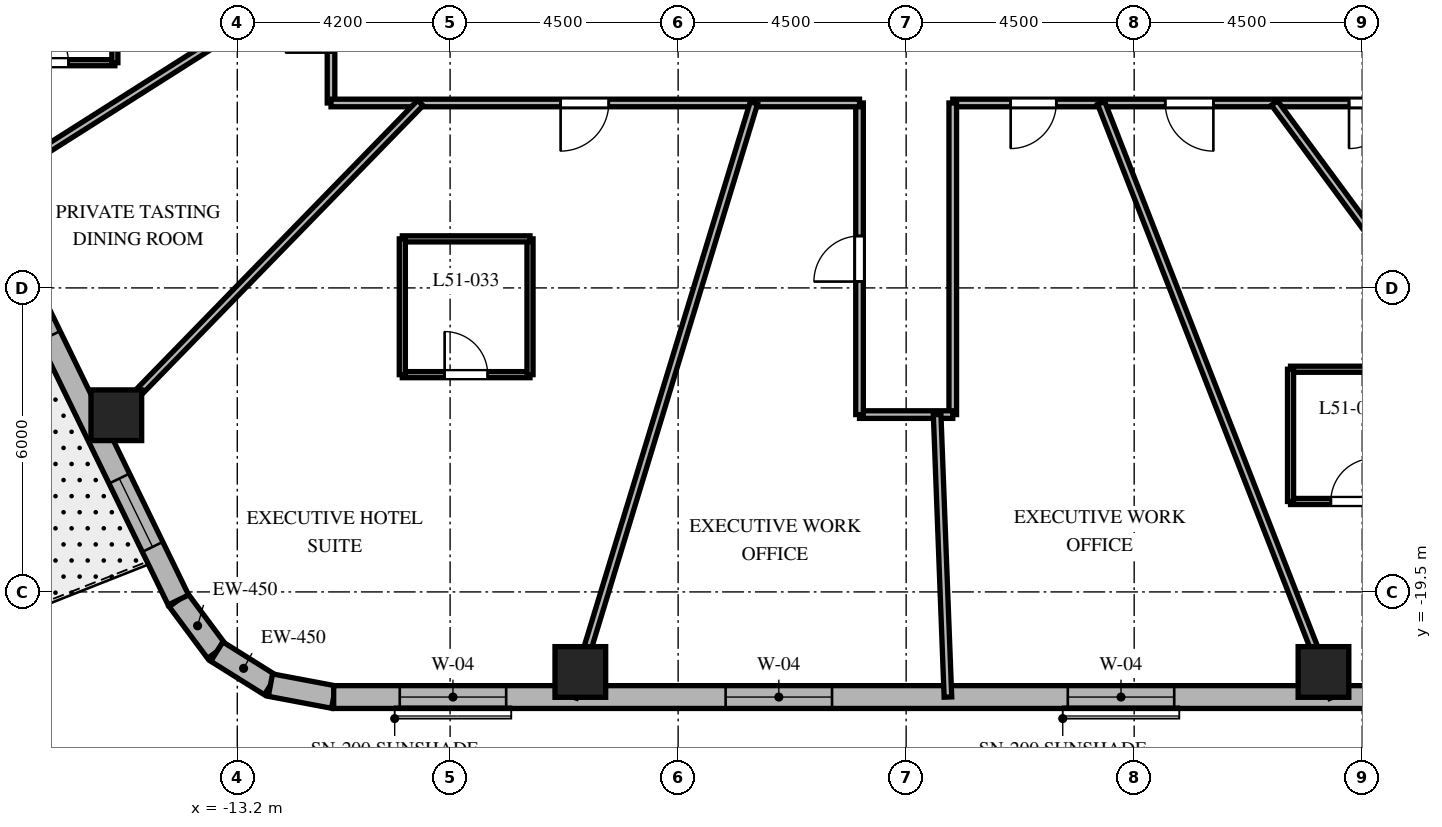
"""IFC4 building model, lengths in metres.
Left out: names, types, materials, properties, quantities, classifications, styles, units other than length and angle.
Written with IfcOpenShell. Run it as: python <this file> out.ifc"""

import sys

from ifc_helpers import new_model, si_unit, direction, frame, frame_2d, origin, origin_2d, place, context, subcontext, project, spatial, rectangle, extrude, element, fill, save


model = new_model("IFC4")
c1 = context("Model", 3, precision=1e-05, world=origin(), true_north=direction((0.0, 1.0)))
c2 = subcontext(c1, "Body", "Model", "MODEL_VIEW")
j1 = project(units=[si_unit("LENGTHUNIT", "METRE"), si_unit("PLANEANGLEUNIT", "RADIAN")], contexts=[c1])
p1 = place(None, origin())
s1 = spatial("IfcSite", under=j1, at=p1, CompositionType="ELEMENT")
p2 = place(p1, origin())
s2 = spatial("IfcBuilding", under=s1, at=p2, CompositionType="ELEMENT")
p3 = place(p2, frame((0.0, 0.0, 206.5)))
s3 = spatial("IfcBuildingStorey", under=s2, at=p3, CompositionType="ELEMENT", Elevation=206.5)
for number, where, z_axis, x_axis in (
    (1, (-6.43, -21.08, 0.0), (0.0, 0.0, 1.0), (1.0, 0.0, 0.0)),
    (2, (8.236, -21.08, 0.0), (0.0, 0.0, 1.0), (1.0, 0.0, 0.0)),
    (3, (-15.587, -16.013, 0.0), (0.0, 0.0, 1.0), (1.0, 0.0, 0.0)),
):
    element("IfcColumn", number, at=place(p3, frame(where, z_axis=z_axis, x_axis=x_axis)), inside=s3, PredefinedType="COLUMN", context=c2, shape_type="SweptSolid", body=[
        extrude(rectangle(XDim=1.0, YDim=1.0, at=origin_2d()), origin(), (0.0, 0.0, 1.0), 3.8),
    ])
p4 = place(p3, frame((-14.362, -19.658, 0.0), z_axis=(0.0, 0.0, 1.0), x_axis=(0.596642462792, -0.80250717853, 0.0)))
e4 = element("IfcWall", 4, at=p4, inside=s3, PredefinedType="SOLIDWALL", context=c2, shape_type="SweptSolid", body=[
    extrude(rectangle(XDim=1.27, YDim=0.45, at=frame_2d((0.635, 0.0))), origin(), (0.0, 0.0, 1.0), 3.5),
])
p5 = place(p3, frame((-13.604, -20.678, 0.0), z_axis=(0.0, 0.0, 1.0), x_axis=(0.847910404124, -0.53013955387, 0.0)))
e5 = element("IfcWall", 5, at=p5, inside=s3, PredefinedType="SOLIDWALL", context=c2, shape_type="SweptSolid", body=[
    extrude(rectangle(XDim=1.249, YDim=0.45, at=frame_2d((0.624, 0.0))), origin(), (0.0, 0.0, 1.0), 3.5),
])
p6 = place(p3, frame((-12.546, -21.34, 0.0), z_axis=(0.0, 0.0, 1.0), x_axis=(0.982686750835, -0.18527479519, 0.0)))
e6 = element("IfcWall", 6, at=p6, inside=s3, PredefinedType="SOLIDWALL", context=c2, shape_type="SweptSolid", body=[
    extrude(rectangle(XDim=1.27, YDim=0.45, at=frame_2d((0.635, 0.0))), origin(), (0.0, 0.0, 1.0), 3.5),
])
p7 = place(p3, frame((-11.298, -21.575, 0.0), z_axis=(0.0, 0.0, 1.0), x_axis=(1.0, 0.0, 0.0)))
e7 = element("IfcWall", 7, at=p7, inside=s3, PredefinedType="SOLIDWALL", context=c2, shape_type="SweptSolid", body=[
    extrude(rectangle(XDim=24.399, YDim=0.45, at=frame_2d((12.2, 0.0))), origin(), (0.0, 0.0, 1.0), 3.5),
])
p8 = place(p7, frame((1.304, 0.0, 0.8)))
e8 = element("IfcOpeningElement", 8, at=p8, cuts=e7, PredefinedType="OPENING", context=c2, shape_type="SweptSolid", body=[
    extrude(rectangle(XDim=2.1, YDim=1.85, at=frame_2d((1.05, 0.925))), frame((0.0, 0.235, 0.0), z_axis=(0.0, -1.0, 0.0), x_axis=(1.0, 0.0, 0.0)), (0.0, 0.0, 1.0), 0.47),
])
p9 = place(p7, frame((7.735, 0.0, 0.8)))
e9 = element("IfcOpeningElement", 9, at=p9, cuts=e7, PredefinedType="OPENING", context=c2, shape_type="SweptSolid", body=[
    extrude(rectangle(XDim=2.1, YDim=1.85, at=frame_2d((1.05, 0.925))), frame((0.0, 0.235, 0.0), z_axis=(0.0, -1.0, 0.0), x_axis=(1.0, 0.0, 0.0)), (0.0, 0.0, 1.0), 0.47),
])
p10 = place(p7, frame((14.488, 0.0, 0.8)))
e10 = element("IfcOpeningElement", 10, at=p10, cuts=e7, PredefinedType="OPENING", context=c2, shape_type="SweptSolid", body=[
    extrude(rectangle(XDim=2.1, YDim=1.85, at=frame_2d((1.05, 0.925))), frame((0.0, 0.235, 0.0), z_axis=(0.0, -1.0, 0.0), x_axis=(1.0, 0.0, 0.0)), (0.0, 0.0, 1.0), 0.47),
])
p11 = place(p7, frame((20.996, 0.0, 0.8)))
e11 = element("IfcOpeningElement", 11, at=p11, cuts=e7, PredefinedType="OPENING", context=c2, shape_type="SweptSolid", body=[
    extrude(rectangle(XDim=2.1, YDim=1.85, at=frame_2d((1.05, 0.925))), frame((0.0, 0.235, 0.0), z_axis=(0.0, -1.0, 0.0), x_axis=(1.0, 0.0, 0.0)), (0.0, 0.0, 1.0), 0.47),
])
p12 = place(p3, frame((-22.74, -2.452, 0.0), z_axis=(0.0, 0.0, 1.0), x_axis=(0.437753424814, -0.899095066755, 0.0)))
e12 = element("IfcWall", 12, at=p12, inside=s3, PredefinedType="SOLIDWALL", context=c2, shape_type="SweptSolid", body=[
    extrude(rectangle(XDim=19.137, YDim=0.45, at=frame_2d((9.569, 0.0))), origin(), (0.0, 0.0, 1.0), 3.5),
])
p13 = place(p12, frame((4.763, 0.0, 0.0)))
e13 = element("IfcOpeningElement", 13, at=p13, cuts=e12, PredefinedType="OPENING", context=c2, shape_type="SweptSolid", body=[
    extrude(rectangle(XDim=0.95, YDim=2.15, at=frame_2d((0.475, 1.075))), frame((0.0, 0.235, 0.0), z_axis=(0.0, -1.0, 0.0), x_axis=(1.0, 0.0, 0.0)), (0.0, 0.0, 1.0), 0.47),
])
p14 = place(p12, frame((1.216, 0.0, 0.8)))
e14 = element("IfcOpeningElement", 14, at=p14, cuts=e12, PredefinedType="OPENING", context=c2, shape_type="SweptSolid", body=[
    extrude(rectangle(XDim=1.5, YDim=1.8, at=frame_2d((0.75, 0.9))), frame((0.0, 0.235, 0.0), z_axis=(0.0, -1.0, 0.0), x_axis=(1.0, 0.0, 0.0)), (0.0, 0.0, 1.0), 0.47),
])
p15 = place(p12, frame((6.451, 0.0, 0.8)))
e15 = element("IfcOpeningElement", 15, at=p15, cuts=e12, PredefinedType="OPENING", context=c2, shape_type="SweptSolid", body=[
    extrude(rectangle(XDim=1.5, YDim=1.8, at=frame_2d((0.75, 0.9))), frame((0.0, 0.235, 0.0), z_axis=(0.0, -1.0, 0.0), x_axis=(1.0, 0.0, 0.0)), (0.0, 0.0, 1.0), 0.47),
])
p16 = place(p12, frame((11.845, 0.0, 0.8)))
e16 = element("IfcOpeningElement", 16, at=p16, cuts=e12, PredefinedType="OPENING", context=c2, shape_type="SweptSolid", body=[
    extrude(rectangle(XDim=1.5, YDim=1.8, at=frame_2d((0.75, 0.9))), frame((0.0, 0.235, 0.0), z_axis=(0.0, -1.0, 0.0), x_axis=(1.0, 0.0, 0.0)), (0.0, 0.0, 1.0), 0.47),
])
p17 = place(p12, frame((16.473, 0.0, 0.8)))
e17 = element("IfcOpeningElement", 17, at=p17, cuts=e12, PredefinedType="OPENING", context=c2, shape_type="SweptSolid", body=[
    extrude(rectangle(XDim=1.5, YDim=1.8, at=frame_2d((0.75, 0.9))), frame((0.0, 0.235, 0.0), z_axis=(0.0, -1.0, 0.0), x_axis=(1.0, 0.0, 0.0)), (0.0, 0.0, 1.0), 0.47),
])
p18 = place(p3, frame((-11.35, -9.85, 0.0), z_axis=(0.0, 0.0, 1.0), x_axis=(0.0, 1.0, 0.0)))
e18 = element("IfcWall", 18, at=p18, inside=s3, PredefinedType="PARTITIONING", context=c2, shape_type="SweptSolid", body=[
    extrude(rectangle(XDim=12.4, YDim=0.15, at=frame_2d((6.2, 0.0))), origin(), (0.0, 0.0, 1.0), 2.99),
])
p19 = place(p18, frame((8.835, 0.0, 0.0)))
e19 = element("IfcOpeningElement", 19, at=p19, cuts=e18, PredefinedType="OPENING", context=c2, shape_type="SweptSolid", body=[
    extrude(rectangle(XDim=0.95, YDim=2.03, at=frame_2d((0.475, 1.015))), frame((0.0, 0.085, 0.0), z_axis=(0.0, -1.0, 0.0), x_axis=(1.0, 0.0, 0.0)), (0.0, 0.0, 1.0), 0.17),
])
p20 = place(p18, frame((4.191, 0.0, 0.0)))
e20 = element("IfcOpeningElement", 20, at=p20, cuts=e18, PredefinedType="OPENING", context=c2, shape_type="SweptSolid", body=[
    extrude(rectangle(XDim=0.95, YDim=2.03, at=frame_2d((0.475, 1.015))), frame((0.0, 0.085, 0.0), z_axis=(0.0, -1.0, 0.0), x_axis=(1.0, 0.0, 0.0)), (0.0, 0.0, 1.0), 0.17),
])
p21 = place(p18, frame((0.994, 0.0, 0.0)))
e21 = element("IfcOpeningElement", 21, at=p21, cuts=e18, PredefinedType="OPENING", context=c2, shape_type="SweptSolid", body=[
    extrude(rectangle(XDim=0.9, YDim=2.03, at=frame_2d((0.45, 1.015))), frame((0.0, 0.085, 0.0), z_axis=(0.0, -1.0, 0.0), x_axis=(1.0, 0.0, 0.0)), (0.0, 0.0, 1.0), 0.17),
])
p22 = place(p3, frame((11.35, -9.85, 0.0), z_axis=(0.0, 0.0, 1.0), x_axis=(-1.0, 0.0, 0.0)))
e22 = element("IfcWall", 22, at=p22, inside=s3, PredefinedType="PARTITIONING", context=c2, shape_type="SweptSolid", body=[
    extrude(rectangle(XDim=10.43, YDim=0.15, at=frame_2d((5.215, 0.0))), origin(), (0.0, 0.0, 1.0), 2.99),
])
p23 = place(p22, frame((8.387, 0.0, 0.0)))
e23 = element("IfcOpeningElement", 23, at=p23, cuts=e22, PredefinedType="OPENING", context=c2, shape_type="SweptSolid", body=[
    extrude(rectangle(XDim=0.9, YDim=2.03, at=frame_2d((0.45, 1.015))), frame((0.0, 0.085, 0.0), z_axis=(0.0, -1.0, 0.0), x_axis=(1.0, 0.0, 0.0)), (0.0, 0.0, 1.0), 0.17),
])
p24 = place(p22, frame((5.287, 0.0, 0.0)))
e24 = element("IfcOpeningElement", 24, at=p24, cuts=e22, PredefinedType="OPENING", context=c2, shape_type="SweptSolid", body=[
    extrude(rectangle(XDim=0.95, YDim=2.03, at=frame_2d((0.475, 1.015))), frame((0.0, 0.085, 0.0), z_axis=(0.0, -1.0, 0.0), x_axis=(1.0, 0.0, 0.0)), (0.0, 0.0, 1.0), 0.17),
])
p25 = place(p22, frame((1.71, 0.0, 0.0)))
e25 = element("IfcOpeningElement", 25, at=p25, cuts=e22, PredefinedType="OPENING", context=c2, shape_type="SweptSolid", body=[
    extrude(rectangle(XDim=0.9, YDim=2.03, at=frame_2d((0.45, 1.015))), frame((0.0, 0.085, 0.0), z_axis=(0.0, -1.0, 0.0), x_axis=(1.0, 0.0, 0.0)), (0.0, 0.0, 1.0), 0.17),
])
p26 = place(p3, frame((0.92, -9.85, 0.0), z_axis=(0.0, 0.0, 1.0), x_axis=(0.0, -1.0, 0.0)))
e26 = element("IfcWall", 26, at=p26, inside=s3, PredefinedType="PARTITIONING", context=c2, shape_type="SweptSolid", body=[
    extrude(rectangle(XDim=6.15, YDim=0.15, at=frame_2d((3.075, 0.0))), origin(), (0.0, 0.0, 1.0), 3.027),
])
p27 = place(p3, frame((0.92, -16.0, 0.0), z_axis=(0.0, 0.0, 1.0), x_axis=(-1.0, 0.0, 0.0)))
e27 = element("IfcWall", 27, at=p27, inside=s3, PredefinedType="PARTITIONING", context=c2, shape_type="SweptSolid", body=[
    extrude(rectangle(XDim=1.84, YDim=0.15, at=frame_2d((0.92, 0.0))), origin(), (0.0, 0.0, 1.0), 3.5),
])
p28 = place(p3, frame((-0.92, -16.0, 0.0), z_axis=(0.0, 0.0, 1.0), x_axis=(0.0, 1.0, 0.0)))
e28 = element("IfcWall", 28, at=p28, inside=s3, PredefinedType="PARTITIONING", context=c2, shape_type="SweptSolid", body=[
    extrude(rectangle(XDim=6.15, YDim=0.15, at=frame_2d((3.075, 0.0))), origin(), (0.0, 0.0, 1.0), 3.027),
])
p29 = place(p28, frame((2.625, 0.0, 0.0)))
e29 = element("IfcOpeningElement", 29, at=p29, cuts=e28, PredefinedType="OPENING", context=c2, shape_type="SweptSolid", body=[
    extrude(rectangle(XDim=0.9, YDim=2.03, at=frame_2d((0.45, 1.015))), frame((0.0, 0.085, 0.0), z_axis=(0.0, -1.0, 0.0), x_axis=(1.0, 0.0, 0.0)), (0.0, 0.0, 1.0), 0.17),
])
p30 = place(p3, frame((-0.92, -9.85, 0.0), z_axis=(0.0, 0.0, 1.0), x_axis=(-1.0, 0.0, 0.0)))
e30 = element("IfcWall", 30, at=p30, inside=s3, PredefinedType="PARTITIONING", context=c2, shape_type="SweptSolid", body=[
    extrude(rectangle(XDim=10.43, YDim=0.15, at=frame_2d((5.215, 0.0))), origin(), (0.0, 0.0, 1.0), 2.99),
])
p31 = place(p30, frame((4.949, 0.0, 0.0)))
e31 = element("IfcOpeningElement", 31, at=p31, cuts=e30, PredefinedType="OPENING", context=c2, shape_type="SweptSolid", body=[
    extrude(rectangle(XDim=0.95, YDim=2.03, at=frame_2d((0.475, 1.015))), frame((0.0, 0.085, 0.0), z_axis=(0.0, -1.0, 0.0), x_axis=(1.0, 0.0, 0.0)), (0.0, 0.0, 1.0), 0.17),
])
p32 = place(p3, frame((-11.35, -7.202, 0.0), z_axis=(0.0, 0.0, 1.0), x_axis=(-0.844364592263, -0.535769013039, 0.0)))
e32 = element("IfcWall", 32, at=p32, inside=s3, PredefinedType="PARTITIONING", context=c2, shape_type="SweptSolid", body=[
    extrude(rectangle(XDim=8.213, YDim=0.15, at=frame_2d((4.106, 0.0))), origin(), (0.0, 0.0, 1.0), 2.74),
])
p33 = place(p3, frame((-9.588, -9.85, 0.0), z_axis=(0.0, 0.0, 1.0), x_axis=(-0.697519469595, -0.716565830567, 0.0)))
e33 = element("IfcWall", 33, at=p33, inside=s3, PredefinedType="PARTITIONING", context=c2, shape_type="SweptSolid", body=[
    extrude(rectangle(XDim=9.126, YDim=0.15, at=frame_2d((4.563, 0.0))), origin(), (0.0, 0.0, 1.0), 2.74),
])
p34 = place(p3, frame((-3.004, -9.85, 0.0), z_axis=(0.0, 0.0, 1.0), x_axis=(-0.291775760688, -0.956486751333, 0.0)))
e34 = element("IfcWall", 34, at=p34, inside=s3, PredefinedType="PARTITIONING", context=c2, shape_type="SweptSolid", body=[
    extrude(rectangle(XDim=12.258, YDim=0.15, at=frame_2d((6.129, 0.0))), origin(), (0.0, 0.0, 1.0), 2.74),
])
p35 = place(p3, frame((0.612, -16.0, 0.0), z_axis=(0.0, 0.0, 1.0), x_axis=(0.038202877739, -0.999270003619, 0.0)))
e35 = element("IfcWall", 35, at=p35, inside=s3, PredefinedType="PARTITIONING", context=c2, shape_type="SweptSolid", body=[
    extrude(rectangle(XDim=5.579, YDim=0.15, at=frame_2d((2.79, 0.0))), origin(), (0.0, 0.0, 1.0), 2.74),
])
p36 = place(p3, frame((3.848, -9.85, 0.0), z_axis=(0.0, 0.0, 1.0), x_axis=(0.363921778212, -0.931429513889, 0.0)))
e36 = element("IfcWall", 36, at=p36, inside=s3, PredefinedType="PARTITIONING", context=c2, shape_type="SweptSolid", body=[
    extrude(rectangle(XDim=12.588, YDim=0.15, at=frame_2d((6.294, 0.0))), origin(), (0.0, 0.0, 1.0), 2.74),
])
p37 = place(p3, frame((7.269, -9.85, 0.0), z_axis=(0.0, 0.0, 1.0), x_axis=(0.593814492791, -0.8046019812, 0.0)))
e37 = element("IfcWall", 37, at=p37, inside=s3, PredefinedType="PARTITIONING", context=c2, shape_type="SweptSolid", body=[
    extrude(rectangle(XDim=13.338, YDim=0.15, at=frame_2d((6.669, 0.0))), origin(), (0.0, 0.0, 1.0), 2.74),
])
p38 = place(p3, frame((-18.296, -9.055, 0.0), z_axis=(0.0, 0.0, 1.0), x_axis=(1.0, 0.0, 0.0)))
e38 = element("IfcWall", 38, at=p38, inside=s3, PredefinedType="PARTITIONING", context=c2, shape_type="SweptSolid", body=[
    extrude(rectangle(XDim=2.68, YDim=0.12, at=frame_2d((1.34, 0.0))), origin(), (0.0, 0.0, 1.0), 3.027),
])
p39 = place(p38, frame((0.915, 0.0, 0.0)))
e39 = element("IfcOpeningElement", 39, at=p39, cuts=e38, PredefinedType="OPENING", context=c2, shape_type="SweptSolid", body=[
    extrude(rectangle(XDim=0.85, YDim=2.03, at=frame_2d((0.425, 1.015))), frame((0.0, 0.07, 0.0), z_axis=(0.0, -1.0, 0.0), x_axis=(1.0, 0.0, 0.0)), (0.0, 0.0, 1.0), 0.14),
])
p40 = place(p3, frame((-15.616, -9.055, 0.0), z_axis=(0.0, 0.0, 1.0), x_axis=(0.0, 1.0, 0.0)))
e40 = element("IfcWall", 40, at=p40, inside=s3, PredefinedType="PARTITIONING", context=c2, shape_type="SweptSolid", body=[
    extrude(rectangle(XDim=2.54, YDim=0.12, at=frame_2d((1.27, 0.0))), origin(), (0.0, 0.0, 1.0), 2.99),
])
p41 = place(p3, frame((-9.943, -15.212, 0.0), z_axis=(0.0, 0.0, 1.0), x_axis=(1.0, 0.0, 0.0)))
e41 = element("IfcWall", 41, at=p41, inside=s3, PredefinedType="PARTITIONING", context=c2, shape_type="SweptSolid", body=[
    extrude(rectangle(XDim=2.52, YDim=0.12, at=frame_2d((1.26, 0.0))), origin(), (0.0, 0.0, 1.0), 3.073),
])
p42 = place(p41, frame((0.835, 0.0, 0.0)))
e42 = element("IfcOpeningElement", 42, at=p42, cuts=e41, PredefinedType="OPENING", context=c2, shape_type="SweptSolid", body=[
    extrude(rectangle(XDim=0.85, YDim=2.03, at=frame_2d((0.425, 1.015))), frame((0.0, 0.07, 0.0), z_axis=(0.0, -1.0, 0.0), x_axis=(1.0, 0.0, 0.0)), (0.0, 0.0, 1.0), 0.14),
])
p43 = place(p3, frame((-7.423, -15.212, 0.0), z_axis=(0.0, 0.0, 1.0), x_axis=(0.0, 1.0, 0.0)))
e43 = element("IfcWall", 43, at=p43, inside=s3, PredefinedType="PARTITIONING", context=c2, shape_type="SweptSolid", body=[
    extrude(rectangle(XDim=2.68, YDim=0.12, at=frame_2d((1.34, 0.0))), origin(), (0.0, 0.0, 1.0), 2.94),
])
p44 = place(p3, frame((-7.423, -12.532, 0.0), z_axis=(0.0, 0.0, 1.0), x_axis=(-1.0, 0.0, 0.0)))
e44 = element("IfcWall", 44, at=p44, inside=s3, PredefinedType="PARTITIONING", context=c2, shape_type="SweptSolid", body=[
    extrude(rectangle(XDim=2.52, YDim=0.12, at=frame_2d((1.26, 0.0))), origin(), (0.0, 0.0, 1.0), 2.94),
])
p45 = place(p3, frame((-9.943, -12.532, 0.0), z_axis=(0.0, 0.0, 1.0), x_axis=(0.0, -1.0, 0.0)))
e45 = element("IfcWall", 45, at=p45, inside=s3, PredefinedType="PARTITIONING", context=c2, shape_type="SweptSolid", body=[
    extrude(rectangle(XDim=2.68, YDim=0.12, at=frame_2d((1.34, 0.0))), origin(), (0.0, 0.0, 1.0), 3.073),
])
p46 = place(p3, frame((7.586, -17.715, 0.0), z_axis=(0.0, 0.0, 1.0), x_axis=(1.0, 0.0, 0.0)))
e46 = element("IfcWall", 46, at=p46, inside=s3, PredefinedType="PARTITIONING", context=c2, shape_type="SweptSolid", body=[
    extrude(rectangle(XDim=2.44, YDim=0.12, at=frame_2d((1.22, 0.0))), origin(), (0.0, 0.0, 1.0), 2.99),
])
p47 = place(p46, frame((0.795, 0.0, 0.0)))
e47 = element("IfcOpeningElement", 47, at=p47, cuts=e46, PredefinedType="OPENING", context=c2, shape_type="SweptSolid", body=[
    extrude(rectangle(XDim=0.85, YDim=2.03, at=frame_2d((0.425, 1.015))), frame((0.0, 0.07, 0.0), z_axis=(0.0, -1.0, 0.0), x_axis=(1.0, 0.0, 0.0)), (0.0, 0.0, 1.0), 0.14),
])
p48 = place(p3, frame((10.026, -15.105, 0.0), z_axis=(0.0, 0.0, 1.0), x_axis=(-1.0, 0.0, 0.0)))
e48 = element("IfcWall", 48, at=p48, inside=s3, PredefinedType="PARTITIONING", context=c2, shape_type="SweptSolid", body=[
    extrude(rectangle(XDim=2.44, YDim=0.12, at=frame_2d((1.22, 0.0))), origin(), (0.0, 0.0, 1.0), 2.99),
])
p49 = place(p3, frame((7.586, -15.105, 0.0), z_axis=(0.0, 0.0, 1.0), x_axis=(0.0, -1.0, 0.0)))
e49 = element("IfcWall", 49, at=p49, inside=s3, PredefinedType="PARTITIONING", context=c2, shape_type="SweptSolid", body=[
    extrude(rectangle(XDim=2.61, YDim=0.12, at=frame_2d((1.305, 0.0))), origin(), (0.0, 0.0, 1.0), 2.94),
])
p50 = place(p8, origin())
e50 = element("IfcWindow", 50, at=p50, inside=s3, PartitioningType="SINGLE_PANEL", PredefinedType="WINDOW", context=c2, shape_type="SweptSolid", body=[
    extrude(rectangle(XDim=2.1, YDim=1.85, at=frame_2d((1.05, 0.925))), frame((0.0, 0.03, 0.0), z_axis=(0.0, -1.0, 0.0), x_axis=(1.0, 0.0, 0.0)), (0.0, 0.0, 1.0), 0.06),
])
fill(e8, e50)
p51 = place(p9, origin())
e51 = element("IfcWindow", 51, at=p51, inside=s3, PartitioningType="SINGLE_PANEL", PredefinedType="WINDOW", context=c2, shape_type="SweptSolid", body=[
    extrude(rectangle(XDim=2.1, YDim=1.85, at=frame_2d((1.05, 0.925))), frame((0.0, 0.03, 0.0), z_axis=(0.0, -1.0, 0.0), x_axis=(1.0, 0.0, 0.0)), (0.0, 0.0, 1.0), 0.06),
])
fill(e9, e51)
p52 = place(p10, origin())
e52 = element("IfcWindow", 52, at=p52, inside=s3, PartitioningType="SINGLE_PANEL", PredefinedType="WINDOW", context=c2, shape_type="SweptSolid", body=[
    extrude(rectangle(XDim=2.1, YDim=1.85, at=frame_2d((1.05, 0.925))), frame((0.0, 0.03, 0.0), z_axis=(0.0, -1.0, 0.0), x_axis=(1.0, 0.0, 0.0)), (0.0, 0.0, 1.0), 0.06),
])
fill(e10, e52)
p53 = place(p17, origin())
e53 = element("IfcWindow", 53, at=p53, inside=s3, PartitioningType="SINGLE_PANEL", PredefinedType="WINDOW", context=c2, shape_type="SweptSolid", body=[
    extrude(rectangle(XDim=1.5, YDim=1.8, at=frame_2d((0.75, 0.9))), frame((0.0, 0.03, 0.0), z_axis=(0.0, -1.0, 0.0), x_axis=(1.0, 0.0, 0.0)), (0.0, 0.0, 1.0), 0.06),
])
fill(e17, e53)
p54 = place(p39, origin())
e54 = element("IfcDoor", 54, at=p54, inside=s3, OperationType="SINGLE_SWING_LEFT", PredefinedType="DOOR", context=c2, shape_type="SweptSolid", body=[
    extrude(rectangle(XDim=0.85, YDim=2.03, at=frame_2d((0.425, 1.015))), frame((0.0, 0.025, 0.0), z_axis=(0.0, -1.0, 0.0), x_axis=(1.0, 0.0, 0.0)), (0.0, 0.0, 1.0), 0.05),
])
fill(e39, e54)
p55 = place(p21, origin())
e55 = element("IfcDoor", 55, at=p55, inside=s3, OperationType="SINGLE_SWING_LEFT", PredefinedType="DOOR", context=c2, shape_type="SweptSolid", body=[
    extrude(rectangle(XDim=0.9, YDim=2.03, at=frame_2d((0.45, 1.015))), frame((0.0, 0.025, 0.0), z_axis=(0.0, -1.0, 0.0), x_axis=(1.0, 0.0, 0.0)), (0.0, 0.0, 1.0), 0.05),
])
fill(e21, e55)
p56 = place(p31, origin())
e56 = element("IfcDoor", 56, at=p56, inside=s3, OperationType="SINGLE_SWING_RIGHT", PredefinedType="DOOR", context=c2, shape_type="SweptSolid", body=[
    extrude(rectangle(XDim=0.95, YDim=2.03, at=frame_2d((0.475, 1.015))), frame((0.0, 0.025, 0.0), z_axis=(0.0, -1.0, 0.0), x_axis=(1.0, 0.0, 0.0)), (0.0, 0.0, 1.0), 0.05),
])
fill(e31, e56)
p57 = place(p42, origin())
e57 = element("IfcDoor", 57, at=p57, inside=s3, OperationType="SINGLE_SWING_LEFT", PredefinedType="DOOR", context=c2, shape_type="SweptSolid", body=[
    extrude(rectangle(XDim=0.85, YDim=2.03, at=frame_2d((0.425, 1.015))), frame((0.0, 0.025, 0.0), z_axis=(0.0, -1.0, 0.0), x_axis=(1.0, 0.0, 0.0)), (0.0, 0.0, 1.0), 0.05),
])
fill(e42, e57)
p58 = place(p29, origin())
e58 = element("IfcDoor", 58, at=p58, inside=s3, OperationType="SINGLE_SWING_LEFT", PredefinedType="DOOR", context=c2, shape_type="SweptSolid", body=[
    extrude(rectangle(XDim=0.9, YDim=2.03, at=frame_2d((0.45, 1.015))), frame((0.0, 0.025, 0.0), z_axis=(0.0, -1.0, 0.0), x_axis=(1.0, 0.0, 0.0)), (0.0, 0.0, 1.0), 0.05),
])
fill(e29, e58)
p59 = place(p23, origin())
e59 = element("IfcDoor", 59, at=p59, inside=s3, OperationType="SINGLE_SWING_RIGHT", PredefinedType="DOOR", context=c2, shape_type="SweptSolid", body=[
    extrude(rectangle(XDim=0.9, YDim=2.03, at=frame_2d((0.45, 1.015))), frame((0.0, 0.025, 0.0), z_axis=(0.0, -1.0, 0.0), x_axis=(1.0, 0.0, 0.0)), (0.0, 0.0, 1.0), 0.05),
])
fill(e23, e59)
p60 = place(p24, origin())
e60 = element("IfcDoor", 60, at=p60, inside=s3, OperationType="SINGLE_SWING_LEFT", PredefinedType="DOOR", context=c2, shape_type="SweptSolid", body=[
    extrude(rectangle(XDim=0.95, YDim=2.03, at=frame_2d((0.475, 1.015))), frame((0.0, 0.025, 0.0), z_axis=(0.0, -1.0, 0.0), x_axis=(1.0, 0.0, 0.0)), (0.0, 0.0, 1.0), 0.05),
])
fill(e24, e60)
p61 = place(p47, origin())
e61 = element("IfcDoor", 61, at=p61, inside=s3, OperationType="SINGLE_SWING_RIGHT", PredefinedType="DOOR", context=c2, shape_type="SweptSolid", body=[
    extrude(rectangle(XDim=0.85, YDim=2.03, at=frame_2d((0.425, 1.015))), frame((0.0, 0.025, 0.0), z_axis=(0.0, -1.0, 0.0), x_axis=(1.0, 0.0, 0.0)), (0.0, 0.0, 1.0), 0.05),
])
fill(e47, e61)
p62 = place(p25, origin())
e62 = element("IfcDoor", 62, at=p62, inside=s3, OperationType="SINGLE_SWING_RIGHT", PredefinedType="DOOR", context=c2, shape_type="SweptSolid", body=[
    extrude(rectangle(XDim=0.9, YDim=2.03, at=frame_2d((0.45, 1.015))), frame((0.0, 0.025, 0.0), z_axis=(0.0, -1.0, 0.0), x_axis=(1.0, 0.0, 0.0)), (0.0, 0.0, 1.0), 0.05),
])
fill(e25, e62)
save(model, sys.argv[1])
